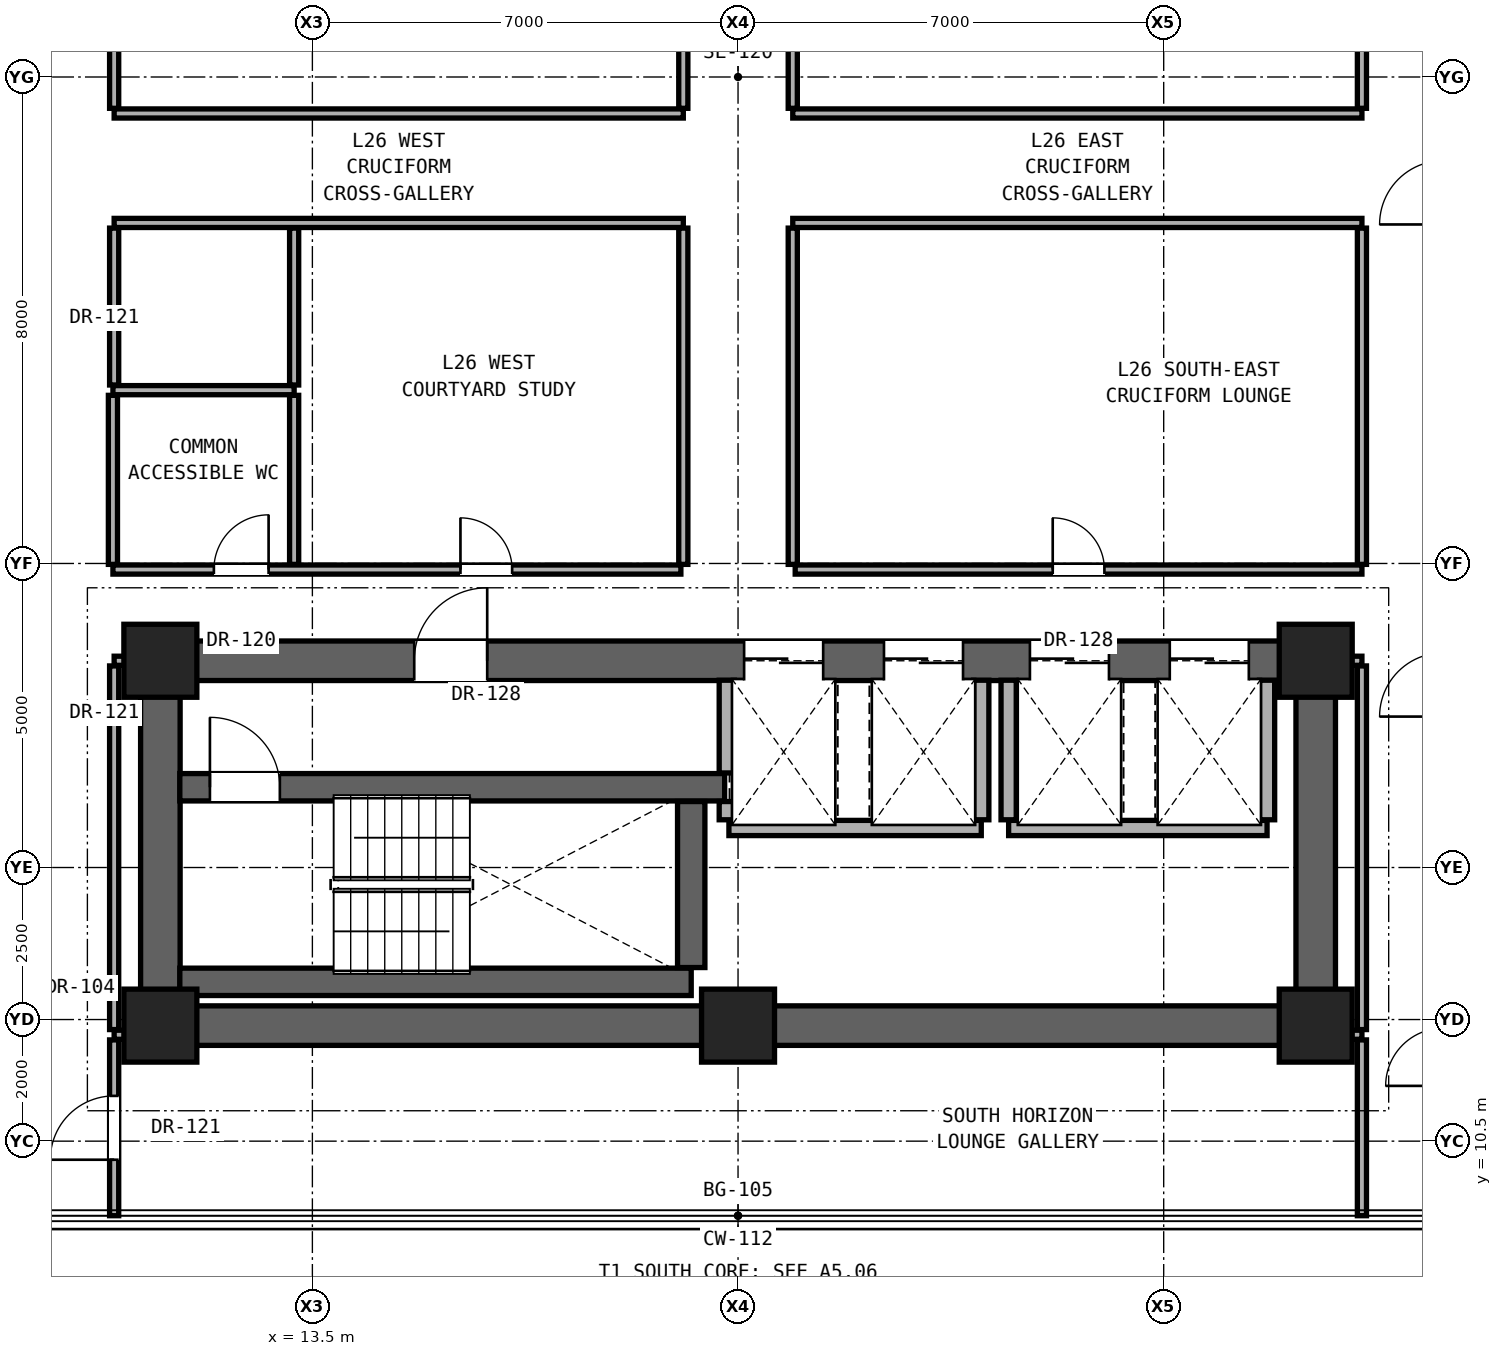
"""IFC4 building model, lengths in metres.
Left out: names, types, materials, properties, quantities, classifications, styles, units other than length and angle.
Written with IfcOpenShell. Run it as: python <this file> out.ifc"""

import sys

from ifc_helpers import new_model, si_unit, direction, frame, frame_2d, origin, origin_2d, place, context, subcontext, project, spatial, rectangle, extrude, element, fill, save


model = new_model("IFC4")
c1 = context("Model", 3, precision=1e-05, world=origin(), true_north=direction((0.0, 1.0)))
c2 = subcontext(c1, "Body", "Model", "MODEL_VIEW")
j1 = project(units=[si_unit("LENGTHUNIT", "METRE"), si_unit("PLANEANGLEUNIT", "RADIAN")], contexts=[c1])
p1 = place(None, origin())
s1 = spatial("IfcSite", under=j1, at=p1, CompositionType="ELEMENT")
p2 = place(p1, origin())
s2 = spatial("IfcBuilding", under=s1, at=p2, CompositionType="ELEMENT")
p3 = place(p2, frame((0.0, 0.0, 95.0)))
s3 = spatial("IfcBuildingStorey", under=s2, at=p3, CompositionType="ELEMENT", Elevation=95.0)
for number, where, z_axis, x_axis in (
    (1, (11.0, 12.4, 0.0), (0.0, 0.0, 1.0), (1.0, 0.0, 0.0)),
    (2, (20.5, 12.4, 0.0), (0.0, 0.0, 1.0), (1.0, 0.0, 0.0)),
    (3, (30.0, 12.4, 0.0), (0.0, 0.0, 1.0), (1.0, 0.0, 0.0)),
    (4, (11.0, 18.4, 0.0), (0.0, 0.0, 1.0), (1.0, 0.0, 0.0)),
    (5, (30.0, 18.4, 0.0), (0.0, 0.0, 1.0), (1.0, 0.0, 0.0)),
):
    element("IfcColumn", number, at=place(p3, frame(where, z_axis=z_axis, x_axis=x_axis)), inside=s3, PredefinedType="COLUMN", context=c2, shape_type="SweptSolid", body=[
        extrude(rectangle(XDim=1.2, YDim=1.2, at=origin_2d()), origin(), (0.0, 0.0, 1.0), 3.3),
    ])
p4 = place(p3, frame((11.0, 12.4, 0.0), z_axis=(0.0, 0.0, 1.0), x_axis=(1.0, 0.0, 0.0)))
e6 = element("IfcWall", 6, at=p4, inside=s3, PredefinedType="SHEAR", context=c2, shape_type="SweptSolid", body=[
    extrude(rectangle(XDim=19.0, YDim=0.65, at=frame_2d((9.5, 0.0))), origin(), (0.0, 0.0, 1.0), 3.08),
])
for number, where, z_axis, x_axis in (
    (7, (11.0, 12.4, 0.0), (0.0, 0.0, 1.0), (0.0, 1.0, 0.0)),
    (8, (30.0, 12.4, 0.0), (0.0, 0.0, 1.0), (0.0, 1.0, 0.0)),
):
    element("IfcWall", number, at=place(p3, frame(where, z_axis=z_axis, x_axis=x_axis)), inside=s3, PredefinedType="SHEAR", context=c2, shape_type="SweptSolid", body=[
        extrude(rectangle(XDim=6.0, YDim=0.65, at=frame_2d((3.0, 0.0))), origin(), (0.0, 0.0, 1.0), 3.08),
    ])
p5 = place(p3, frame((11.0, 18.4, 0.0), z_axis=(0.0, 0.0, 1.0), x_axis=(1.0, 0.0, 0.0)))
e9 = element("IfcWall", 9, at=p5, inside=s3, PredefinedType="SHEAR", context=c2, shape_type="SweptSolid", body=[
    extrude(rectangle(XDim=19.0, YDim=0.65, at=frame_2d((9.5, 0.0))), origin(), (0.0, 0.0, 1.0), 3.08),
])
p6 = place(p5, frame((4.175, 0.0, 0.0)))
e10 = element("IfcOpeningElement", 10, at=p6, cuts=e9, PredefinedType="OPENING", context=c2, shape_type="SweptSolid", body=[
    extrude(rectangle(XDim=1.2, YDim=2.25, at=frame_2d((0.6, 1.125))), frame((0.0, 0.335, 0.0), z_axis=(0.0, -1.0, 0.0), x_axis=(1.0, 0.0, 0.0)), (0.0, 0.0, 1.0), 0.67),
])
p7 = place(p5, frame((9.6, 0.0, 0.0)))
e11 = element("IfcOpeningElement", 11, at=p7, cuts=e9, PredefinedType="OPENING", context=c2, shape_type="SweptSolid", body=[
    extrude(rectangle(XDim=1.3, YDim=2.3, at=frame_2d((0.65, 1.15))), frame((0.0, 0.335, 0.0), z_axis=(0.0, -1.0, 0.0), x_axis=(1.0, 0.0, 0.0)), (0.0, 0.0, 1.0), 0.67),
])
p8 = place(p5, frame((11.9, 0.0, 0.0)))
e12 = element("IfcOpeningElement", 12, at=p8, cuts=e9, PredefinedType="OPENING", context=c2, shape_type="SweptSolid", body=[
    extrude(rectangle(XDim=1.3, YDim=2.3, at=frame_2d((0.65, 1.15))), frame((0.0, 0.335, 0.0), z_axis=(0.0, -1.0, 0.0), x_axis=(1.0, 0.0, 0.0)), (0.0, 0.0, 1.0), 0.67),
])
p9 = place(p5, frame((14.3, 0.0, 0.0)))
e13 = element("IfcOpeningElement", 13, at=p9, cuts=e9, PredefinedType="OPENING", context=c2, shape_type="SweptSolid", body=[
    extrude(rectangle(XDim=1.3, YDim=2.3, at=frame_2d((0.65, 1.15))), frame((0.0, 0.335, 0.0), z_axis=(0.0, -1.0, 0.0), x_axis=(1.0, 0.0, 0.0)), (0.0, 0.0, 1.0), 0.67),
])
p10 = place(p5, frame((16.6, 0.0, 0.0)))
e14 = element("IfcOpeningElement", 14, at=p10, cuts=e9, PredefinedType="OPENING", context=c2, shape_type="SweptSolid", body=[
    extrude(rectangle(XDim=1.3, YDim=2.3, at=frame_2d((0.65, 1.15))), frame((0.0, 0.335, 0.0), z_axis=(0.0, -1.0, 0.0), x_axis=(1.0, 0.0, 0.0)), (0.0, 0.0, 1.0), 0.67),
])
for number, where, z_axis, x_axis in (
    (15, (10.24, 12.25, 0.0), (0.0, 0.0, 1.0), (1.0, 0.0, 0.0)),
    (16, (30.32, 12.25, 0.0), (0.0, 0.0, 1.0), (1.0, 0.0, 0.0)),
):
    element("IfcWall", number, at=place(p3, frame(where, z_axis=z_axis, x_axis=x_axis)), inside=s3, PredefinedType="PARTITIONING", context=c2, shape_type="SweptSolid", body=[
        extrude(rectangle(XDim=0.44, YDim=0.15, at=frame_2d((0.22, 0.0))), origin(), (0.0, 0.0, 1.0), 3.08),
    ])
p11 = place(p3, frame((11.32, 13.12, 0.0), z_axis=(0.0, 0.0, 1.0), x_axis=(1.0, 0.0, 0.0)))
e17 = element("IfcWall", 17, at=p11, inside=s3, PredefinedType="SHEAR", context=c2, shape_type="SweptSolid", body=[
    extrude(rectangle(XDim=8.41, YDim=0.45, at=frame_2d((4.205, 0.0))), origin(), (0.0, 0.0, 1.0), 3.08),
])
p12 = place(p3, frame((20.35, 15.65, 0.0), z_axis=(0.0, 0.0, 1.0), x_axis=(1.0, 0.0, 0.0)))
e18 = element("IfcWall", 18, at=p12, inside=s3, PredefinedType="SOLIDWALL", context=c2, shape_type="SweptSolid", body=[
    extrude(rectangle(XDim=4.15, YDim=0.25, at=frame_2d((2.075, 0.0))), origin(), (0.0, 0.0, 1.0), 3.08),
])
p13 = place(p3, frame((24.95, 15.65, 0.0), z_axis=(0.0, 0.0, 1.0), x_axis=(1.0, 0.0, 0.0)))
e19 = element("IfcWall", 19, at=p13, inside=s3, PredefinedType="SOLIDWALL", context=c2, shape_type="SweptSolid", body=[
    extrude(rectangle(XDim=4.25, YDim=0.25, at=frame_2d((2.125, 0.0))), origin(), (0.0, 0.0, 1.0), 3.08),
])
p14 = place(p3, frame((11.32, 16.32, 0.0), z_axis=(0.0, 0.0, 1.0), x_axis=(1.0, 0.0, 0.0)))
e20 = element("IfcWall", 20, at=p14, inside=s3, PredefinedType="SHEAR", context=c2, shape_type="SweptSolid", body=[
    extrude(rectangle(XDim=8.96, YDim=0.45, at=frame_2d((4.48, 0.0))), origin(), (0.0, 0.0, 1.0), 3.08),
])
p15 = place(p14, frame((0.495, 0.0, 0.0)))
e21 = element("IfcOpeningElement", 21, at=p15, cuts=e20, PredefinedType="OPENING", context=c2, shape_type="SweptSolid", body=[
    extrude(rectangle(XDim=1.15, YDim=2.2, at=frame_2d((0.575, 1.1))), frame((0.0, 0.235, 0.0), z_axis=(0.0, -1.0, 0.0), x_axis=(1.0, 0.0, 0.0)), (0.0, 0.0, 1.0), 0.47),
])
for number, where, z_axis, x_axis in (
    (22, (10.24, 18.4, 0.0), (0.0, 0.0, 1.0), (1.0, 0.0, 0.0)),
    (23, (30.32, 18.4, 0.0), (0.0, 0.0, 1.0), (1.0, 0.0, 0.0)),
):
    element("IfcWall", number, at=place(p3, frame(where, z_axis=z_axis, x_axis=x_axis)), inside=s3, PredefinedType="PARTITIONING", context=c2, shape_type="SweptSolid", body=[
        extrude(rectangle(XDim=0.44, YDim=0.15, at=frame_2d((0.22, 0.0))), origin(), (0.0, 0.0, 1.0), 2.456),
    ])
p16 = place(p3, frame((10.22, 19.9, 0.0), z_axis=(0.0, 0.0, 1.0), x_axis=(1.0, 0.0, 0.0)))
e24 = element("IfcWall", 24, at=p16, inside=s3, PredefinedType="PARTITIONING", context=c2, shape_type="SweptSolid", body=[
    extrude(rectangle(XDim=9.34, YDim=0.15, at=frame_2d((4.67, 0.0))), origin(), (0.0, 0.0, 1.0), 2.124),
])
p17 = place(p16, frame((1.66, 0.0, 0.0)))
e25 = element("IfcOpeningElement", 25, at=p17, cuts=e24, PredefinedType="OPENING", context=c2, shape_type="SweptSolid", body=[
    extrude(rectangle(XDim=0.9, YDim=2.1, at=frame_2d((0.45, 1.05))), frame((0.0, 0.085, 0.0), z_axis=(0.0, -1.0, 0.0), x_axis=(1.0, 0.0, 0.0)), (0.0, 0.0, 1.0), 0.17),
])
p18 = place(p16, frame((5.715, 0.0, 0.0)))
e26 = element("IfcOpeningElement", 26, at=p18, cuts=e24, PredefinedType="OPENING", context=c2, shape_type="SweptSolid", body=[
    extrude(rectangle(XDim=0.85, YDim=2.01, at=frame_2d((0.425, 1.005))), frame((0.0, 0.085, 0.0), z_axis=(0.0, -1.0, 0.0), x_axis=(1.0, 0.0, 0.0)), (0.0, 0.0, 1.0), 0.17),
])
p19 = place(p3, frame((21.44, 19.9, 0.0), z_axis=(0.0, 0.0, 1.0), x_axis=(1.0, 0.0, 0.0)))
e27 = element("IfcWall", 27, at=p19, inside=s3, PredefinedType="PARTITIONING", context=c2, shape_type="SweptSolid", body=[
    extrude(rectangle(XDim=9.32, YDim=0.15, at=frame_2d((4.66, 0.0))), origin(), (0.0, 0.0, 1.0), 2.124),
])
p20 = place(p19, frame((4.235, 0.0, 0.0)))
e28 = element("IfcOpeningElement", 28, at=p20, cuts=e27, PredefinedType="OPENING", context=c2, shape_type="SweptSolid", body=[
    extrude(rectangle(XDim=0.85, YDim=2.01, at=frame_2d((0.425, 1.005))), frame((0.0, 0.085, 0.0), z_axis=(0.0, -1.0, 0.0), x_axis=(1.0, 0.0, 0.0)), (0.0, 0.0, 1.0), 0.17),
])
p21 = place(p3, frame((10.22, 22.85, 0.0), z_axis=(0.0, 0.0, 1.0), x_axis=(1.0, 0.0, 0.0)))
e29 = element("IfcWall", 29, at=p21, inside=s3, PredefinedType="PARTITIONING", context=c2, shape_type="SweptSolid", body=[
    extrude(rectangle(XDim=2.98, YDim=0.15, at=frame_2d((1.49, 0.0))), origin(), (0.0, 0.0, 1.0), 2.124),
])
for number, where, z_axis, x_axis in (
    (30, (10.24, 25.6, 0.0), (0.0, 0.0, 1.0), (1.0, 0.0, 0.0)),
    (31, (21.4, 25.6, 0.0), (0.0, 0.0, 1.0), (1.0, 0.0, 0.0)),
    (32, (10.24, 27.4, 0.0), (0.0, 0.0, 1.0), (1.0, 0.0, 0.0)),
    (33, (21.4, 27.4, 0.0), (0.0, 0.0, 1.0), (1.0, 0.0, 0.0)),
):
    element("IfcWall", number, at=place(p3, frame(where, z_axis=z_axis, x_axis=x_axis)), inside=s3, PredefinedType="PARTITIONING", context=c2, shape_type="SweptSolid", body=[
        extrude(rectangle(XDim=9.36, YDim=0.15, at=frame_2d((4.68, 0.0))), origin(), (0.0, 0.0, 1.0), 2.124),
    ])
p22 = place(p3, frame((10.22, 19.985, 0.0), z_axis=(0.0, 0.0, 1.0), x_axis=(0.0, 1.0, 0.0)))
e34 = element("IfcWall", 34, at=p22, inside=s3, PredefinedType="PARTITIONING", context=c2, shape_type="SweptSolid", body=[
    extrude(rectangle(XDim=2.78, YDim=0.15, at=frame_2d((1.39, 0.0))), origin(), (0.0, 0.0, 1.0), 3.08),
])
p23 = place(p3, frame((10.24, 9.274, 0.0), z_axis=(0.0, 0.0, 1.0), x_axis=(0.0, 1.0, 0.0)))
e35 = element("IfcWall", 35, at=p23, inside=s3, PredefinedType="PARTITIONING", context=c2, shape_type="SweptSolid", body=[
    extrude(rectangle(XDim=2.891, YDim=0.15, at=frame_2d((1.446, 0.0))), origin(), (0.0, 0.0, 1.0), 3.08),
])
p24 = place(p23, frame((0.92, 0.0, 0.0)))
e36 = element("IfcOpeningElement", 36, at=p24, cuts=e35, PredefinedType="OPENING", context=c2, shape_type="SweptSolid", body=[
    extrude(rectangle(XDim=1.05, YDim=2.2, at=frame_2d((0.525, 1.1))), frame((0.0, 0.085, 0.0), z_axis=(0.0, -1.0, 0.0), x_axis=(1.0, 0.0, 0.0)), (0.0, 0.0, 1.0), 0.17),
])
p25 = place(p3, frame((10.24, 12.335, 0.0), z_axis=(0.0, 0.0, 1.0), x_axis=(0.0, 1.0, 0.0)))
e37 = element("IfcWall", 37, at=p25, inside=s3, PredefinedType="PARTITIONING", context=c2, shape_type="SweptSolid", body=[
    extrude(rectangle(XDim=5.98, YDim=0.15, at=frame_2d((2.99, 0.0))), origin(), (0.0, 0.0, 1.0), 2.456),
])
p26 = place(p3, frame((10.24, 22.935, 0.0), z_axis=(0.0, 0.0, 1.0), x_axis=(0.0, 1.0, 0.0)))
e38 = element("IfcWall", 38, at=p26, inside=s3, PredefinedType="PARTITIONING", context=c2, shape_type="SweptSolid", body=[
    extrude(rectangle(XDim=2.58, YDim=0.15, at=frame_2d((1.29, 0.0))), origin(), (0.0, 0.0, 1.0), 2.299),
])
p27 = place(p3, frame((10.24, 27.485, 0.0), z_axis=(0.0, 0.0, 1.0), x_axis=(0.0, 1.0, 0.0)))
e39 = element("IfcWall", 39, at=p27, inside=s3, PredefinedType="PARTITIONING", context=c2, shape_type="SweptSolid", body=[
    extrude(rectangle(XDim=5.53, YDim=0.15, at=frame_2d((2.765, 0.0))), origin(), (0.0, 0.0, 1.0), 2.299),
])
p28 = place(p27, frame((2.29, 0.0, 0.0)))
e40 = element("IfcOpeningElement", 40, at=p28, cuts=e39, PredefinedType="OPENING", context=c2, shape_type="SweptSolid", body=[
    extrude(rectangle(XDim=0.95, YDim=2.15, at=frame_2d((0.475, 1.075))), frame((0.0, 0.085, 0.0), z_axis=(0.0, -1.0, 0.0), x_axis=(1.0, 0.0, 0.0)), (0.0, 0.0, 1.0), 0.17),
])
p29 = place(p3, frame((13.2, 19.985, 0.0), z_axis=(0.0, 0.0, 1.0), x_axis=(0.0, 1.0, 0.0)))
e41 = element("IfcWall", 41, at=p29, inside=s3, PredefinedType="PARTITIONING", context=c2, shape_type="SweptSolid", body=[
    extrude(rectangle(XDim=2.78, YDim=0.15, at=frame_2d((1.39, 0.0))), origin(), (0.0, 0.0, 1.0), 3.08),
])
p30 = place(p3, frame((13.2, 22.935, 0.0), z_axis=(0.0, 0.0, 1.0), x_axis=(0.0, 1.0, 0.0)))
e42 = element("IfcWall", 42, at=p30, inside=s3, PredefinedType="PARTITIONING", context=c2, shape_type="SweptSolid", body=[
    extrude(rectangle(XDim=2.58, YDim=0.15, at=frame_2d((1.29, 0.0))), origin(), (0.0, 0.0, 1.0), 2.124),
])
for number, where, z_axis, x_axis in (
    (43, (19.6, 19.985, 0.0), (0.0, 0.0, 1.0), (0.0, 1.0, 0.0)),
    (44, (19.6, 27.485, 0.0), (0.0, 0.0, 1.0), (0.0, 1.0, 0.0)),
):
    element("IfcWall", number, at=place(p3, frame(where, z_axis=z_axis, x_axis=x_axis)), inside=s3, PredefinedType="PARTITIONING", context=c2, shape_type="SweptSolid", body=[
        extrude(rectangle(XDim=5.53, YDim=0.15, at=frame_2d((2.765, 0.0))), origin(), (0.0, 0.0, 1.0), 2.124),
    ])
p31 = place(p3, frame((19.73, 13.355, 0.0), z_axis=(0.0, 0.0, 1.0), x_axis=(0.0, 1.0, 0.0)))
e45 = element("IfcWall", 45, at=p31, inside=s3, PredefinedType="SHEAR", context=c2, shape_type="SweptSolid", body=[
    extrude(rectangle(XDim=2.73, YDim=0.45, at=frame_2d((1.365, 0.0))), origin(), (0.0, 0.0, 1.0), 3.08),
])
p32 = place(p3, frame((20.315, 15.785, 0.0), z_axis=(0.0, 0.0, 1.0), x_axis=(0.0, 1.0, 0.0)))
e46 = element("IfcWall", 46, at=p32, inside=s3, PredefinedType="SOLIDWALL", context=c2, shape_type="SweptSolid", body=[
    extrude(rectangle(XDim=0.3, YDim=0.25, at=frame_2d((0.15, 0.0))), origin(), (0.0, 0.0, 1.0), 3.08),
])
p33 = place(p3, frame((20.315, 16.555, 0.0), z_axis=(0.0, 0.0, 1.0), x_axis=(0.0, 1.0, 0.0)))
e47 = element("IfcWall", 47, at=p33, inside=s3, PredefinedType="SOLIDWALL", context=c2, shape_type="SweptSolid", body=[
    extrude(rectangle(XDim=1.525, YDim=0.25, at=frame_2d((0.763, 0.0))), origin(), (0.0, 0.0, 1.0), 3.08),
])
for number, where, z_axis, x_axis in (
    (48, (21.4, 19.985, 0.0), (0.0, 0.0, 1.0), (0.0, 1.0, 0.0)),
    (49, (21.4, 27.485, 0.0), (0.0, 0.0, 1.0), (0.0, 1.0, 0.0)),
):
    element("IfcWall", number, at=place(p3, frame(where, z_axis=z_axis, x_axis=x_axis)), inside=s3, PredefinedType="PARTITIONING", context=c2, shape_type="SweptSolid", body=[
        extrude(rectangle(XDim=5.53, YDim=0.15, at=frame_2d((2.765, 0.0))), origin(), (0.0, 0.0, 1.0), 2.124),
    ])
for number, where, z_axis, x_axis in (
    (50, (24.5, 15.785, 0.0), (0.0, 0.0, 1.0), (0.0, 1.0, 0.0)),
    (51, (24.95, 15.785, 0.0), (0.0, 0.0, 1.0), (0.0, 1.0, 0.0)),
    (52, (29.2, 15.785, 0.0), (0.0, 0.0, 1.0), (0.0, 1.0, 0.0)),
):
    element("IfcWall", number, at=place(p3, frame(where, z_axis=z_axis, x_axis=x_axis)), inside=s3, PredefinedType="SOLIDWALL", context=c2, shape_type="SweptSolid", body=[
        extrude(rectangle(XDim=2.295, YDim=0.25, at=frame_2d((1.147, 0.0))), origin(), (0.0, 0.0, 1.0), 3.08),
    ])
p34 = place(p3, frame((30.76, 9.274, 0.0), z_axis=(0.0, 0.0, 1.0), x_axis=(0.0, 1.0, 0.0)))
e53 = element("IfcWall", 53, at=p34, inside=s3, PredefinedType="PARTITIONING", context=c2, shape_type="SweptSolid", body=[
    extrude(rectangle(XDim=2.891, YDim=0.15, at=frame_2d((1.446, 0.0))), origin(), (0.0, 0.0, 1.0), 3.08),
])
p35 = place(p3, frame((30.76, 12.335, 0.0), z_axis=(0.0, 0.0, 1.0), x_axis=(0.0, 1.0, 0.0)))
e54 = element("IfcWall", 54, at=p35, inside=s3, PredefinedType="PARTITIONING", context=c2, shape_type="SweptSolid", body=[
    extrude(rectangle(XDim=5.98, YDim=0.15, at=frame_2d((2.99, 0.0))), origin(), (0.0, 0.0, 1.0), 2.456),
])
for number, where, z_axis, x_axis in (
    (55, (30.76, 19.985, 0.0), (0.0, 0.0, 1.0), (0.0, 1.0, 0.0)),
    (56, (30.76, 27.485, 0.0), (0.0, 0.0, 1.0), (0.0, 1.0, 0.0)),
):
    element("IfcWall", number, at=place(p3, frame(where, z_axis=z_axis, x_axis=x_axis)), inside=s3, PredefinedType="PARTITIONING", context=c2, shape_type="SweptSolid", body=[
        extrude(rectangle(XDim=5.53, YDim=0.15, at=frame_2d((2.765, 0.0))), origin(), (0.0, 0.0, 1.0), 2.299),
    ])
p36 = place(p6, origin())
e57 = element("IfcDoor", 57, at=p36, inside=s3, OperationType="SINGLE_SWING_RIGHT", PredefinedType="DOOR", context=c2, shape_type="SweptSolid", body=[
    extrude(rectangle(XDim=1.2, YDim=2.25, at=frame_2d((0.6, 1.125))), frame((0.0, 0.025, 0.0), z_axis=(0.0, -1.0, 0.0), x_axis=(1.0, 0.0, 0.0)), (0.0, 0.0, 1.0), 0.05),
])
fill(e10, e57)
p37 = place(p15, origin())
e58 = element("IfcDoor", 58, at=p37, inside=s3, OperationType="SINGLE_SWING_LEFT", PredefinedType="DOOR", context=c2, shape_type="SweptSolid", body=[
    extrude(rectangle(XDim=1.15, YDim=2.2, at=frame_2d((0.575, 1.1))), frame((0.0, 0.025, 0.0), z_axis=(0.0, -1.0, 0.0), x_axis=(1.0, 0.0, 0.0)), (0.0, 0.0, 1.0), 0.05),
])
fill(e21, e58)
p38 = place(p17, origin())
e59 = element("IfcDoor", 59, at=p38, inside=s3, OperationType="SINGLE_SWING_RIGHT", PredefinedType="DOOR", context=c2, shape_type="SweptSolid", body=[
    extrude(rectangle(XDim=0.9, YDim=2.1, at=frame_2d((0.45, 1.05))), frame((0.0, 0.025, 0.0), z_axis=(0.0, -1.0, 0.0), x_axis=(1.0, 0.0, 0.0)), (0.0, 0.0, 1.0), 0.05),
])
fill(e25, e59)
p39 = place(p18, origin())
e60 = element("IfcDoor", 60, at=p39, inside=s3, OperationType="SINGLE_SWING_LEFT", PredefinedType="DOOR", context=c2, shape_type="SweptSolid", body=[
    extrude(rectangle(XDim=0.85, YDim=2.01, at=frame_2d((0.425, 1.005))), frame((0.0, 0.025, 0.0), z_axis=(0.0, -1.0, 0.0), x_axis=(1.0, 0.0, 0.0)), (0.0, 0.0, 1.0), 0.05),
])
fill(e26, e60)
p40 = place(p20, origin())
e61 = element("IfcDoor", 61, at=p40, inside=s3, OperationType="SINGLE_SWING_LEFT", PredefinedType="DOOR", context=c2, shape_type="SweptSolid", body=[
    extrude(rectangle(XDim=0.85, YDim=2.01, at=frame_2d((0.425, 1.005))), frame((0.0, 0.025, 0.0), z_axis=(0.0, -1.0, 0.0), x_axis=(1.0, 0.0, 0.0)), (0.0, 0.0, 1.0), 0.05),
])
fill(e28, e61)
p41 = place(p24, origin())
e62 = element("IfcDoor", 62, at=p41, inside=s3, OperationType="SINGLE_SWING_LEFT", PredefinedType="DOOR", context=c2, shape_type="SweptSolid", body=[
    extrude(rectangle(XDim=1.05, YDim=2.2, at=frame_2d((0.525, 1.1))), frame((0.0, 0.025, 0.0), z_axis=(0.0, -1.0, 0.0), x_axis=(1.0, 0.0, 0.0)), (0.0, 0.0, 1.0), 0.05),
])
fill(e36, e62)
p42 = place(p7, origin())
e63 = element("IfcDoor", 63, at=p42, inside=s3, OperationType="DOUBLE_DOOR_SLIDING", PredefinedType="DOOR", context=c2, shape_type="SweptSolid", body=[
    extrude(rectangle(XDim=1.3, YDim=2.3, at=frame_2d((0.65, 1.15))), frame((0.0, 0.025, 0.0), z_axis=(0.0, -1.0, 0.0), x_axis=(1.0, 0.0, 0.0)), (0.0, 0.0, 1.0), 0.05),
])
fill(e11, e63)
p43 = place(p8, origin())
e64 = element("IfcDoor", 64, at=p43, inside=s3, OperationType="DOUBLE_DOOR_SLIDING", PredefinedType="DOOR", context=c2, shape_type="SweptSolid", body=[
    extrude(rectangle(XDim=1.3, YDim=2.3, at=frame_2d((0.65, 1.15))), frame((0.0, 0.025, 0.0), z_axis=(0.0, -1.0, 0.0), x_axis=(1.0, 0.0, 0.0)), (0.0, 0.0, 1.0), 0.05),
])
fill(e12, e64)
p44 = place(p9, origin())
e65 = element("IfcDoor", 65, at=p44, inside=s3, OperationType="DOUBLE_DOOR_SLIDING", PredefinedType="DOOR", context=c2, shape_type="SweptSolid", body=[
    extrude(rectangle(XDim=1.3, YDim=2.3, at=frame_2d((0.65, 1.15))), frame((0.0, 0.025, 0.0), z_axis=(0.0, -1.0, 0.0), x_axis=(1.0, 0.0, 0.0)), (0.0, 0.0, 1.0), 0.05),
])
fill(e13, e65)
p45 = place(p10, origin())
e66 = element("IfcDoor", 66, at=p45, inside=s3, OperationType="DOUBLE_DOOR_SLIDING", PredefinedType="DOOR", context=c2, shape_type="SweptSolid", body=[
    extrude(rectangle(XDim=1.3, YDim=2.3, at=frame_2d((0.65, 1.15))), frame((0.0, 0.025, 0.0), z_axis=(0.0, -1.0, 0.0), x_axis=(1.0, 0.0, 0.0)), (0.0, 0.0, 1.0), 0.05),
])
fill(e14, e66)
save(model, sys.argv[1])
